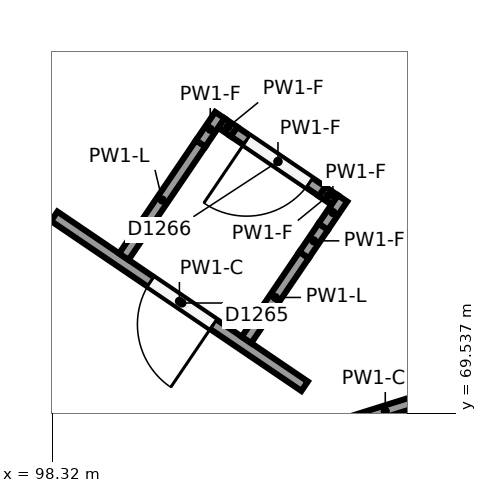
"""IFC4 building model, lengths in metres.
Left out: names, types, materials, properties, quantities, classifications, styles, units other than length and angle.
Written with IfcOpenShell. Run it as: python <this file> out.ifc"""

import sys

from ifc_helpers import new_model, si_unit, direction, frame, frame_2d, origin, origin_2d, place, context, subcontext, project, spatial, rectangle, circle, extrude, element, fill, save


model = new_model("IFC4")
c1 = context("Model", 3, precision=1e-05, world=origin(), true_north=direction((0.0, 1.0)))
c2 = subcontext(c1, "Body", "Model", "MODEL_VIEW")
j1 = project(units=[si_unit("LENGTHUNIT", "METRE"), si_unit("PLANEANGLEUNIT", "RADIAN")], contexts=[c1])
p1 = place(None, origin())
s1 = spatial("IfcSite", under=j1, at=p1, CompositionType="ELEMENT")
p2 = place(p1, origin())
s2 = spatial("IfcBuilding", under=s1, at=p2, CompositionType="ELEMENT")
p3 = place(p2, frame((0.0, 0.0, 12.0)))
s3 = spatial("IfcBuildingStorey", under=s2, at=p3, CompositionType="ELEMENT", Elevation=12.0)
p4 = place(p3, frame((101.14, 69.294, 0.0), z_axis=(0.0, 0.0, 1.0), x_axis=(1.0, 0.0, 0.0)))
e1 = element("IfcColumn", 1, at=p4, inside=s3, PredefinedType="COLUMN", context=c2, shape_type="SweptSolid", body=[
    extrude(circle(Radius=0.4, at=origin_2d()), origin(), (0.0, 0.0, 1.0), 6.0),
])
p5 = place(p3, frame((102.051, 69.36, 0.0), z_axis=(0.0, 0.0, 1.0), x_axis=(0.954243765566, 0.299029824395, 0.0)))
e2 = element("IfcWall", 2, at=p5, inside=s3, PredefinedType="PARTITIONING", context=c2, shape_type="SweptSolid", body=[
    extrude(rectangle(XDim=1.363, YDim=0.15, at=frame_2d((0.681, 0.0))), origin(), (0.0, 0.0, 1.0), 5.55),
])
p6 = place(p3, frame((101.639, 69.893, 0.0), z_axis=(0.0, 0.0, 1.0), x_axis=(-0.82747475675, 0.561502918017, 0.0)))
e3 = element("IfcWall", 3, at=p6, inside=s3, PredefinedType="PARTITIONING", context=c2, shape_type="SweptSolid", body=[
    extrude(rectangle(XDim=3.981, YDim=0.15, at=frame_2d((1.99, 0.0))), origin(), (0.0, 0.0, 1.0), 5.55),
])
p7 = place(p6, frame((1.45, 0.0, 0.0)))
e4 = element("IfcOpeningElement", 4, at=p7, cuts=e3, PredefinedType="OPENING", context=c2, shape_type="SweptSolid", body=[
    extrude(rectangle(XDim=1.0, YDim=2.1, at=frame_2d((0.5, 1.05))), frame((0.0, 0.085, 0.0), z_axis=(0.0, -1.0, 0.0), x_axis=(1.0, 0.0, 0.0)), (0.0, 0.0, 1.0), 0.17),
])
p8 = place(p3, frame((100.875, 70.502, 0.0), z_axis=(0.0, 0.0, 1.0), x_axis=(0.561567757892, 0.827430754382, 0.0)))
e5 = element("IfcWall", 5, at=p8, inside=s3, PredefinedType="PARTITIONING", context=c2, shape_type="SweptSolid", body=[
    extrude(rectangle(XDim=1.35, YDim=0.15, at=frame_2d((0.675, 0.0))), origin(), (0.0, 0.0, 1.0), 5.6),
])
p9 = place(p3, frame((101.633, 71.619, 0.0), z_axis=(0.0, 0.0, 1.0), x_axis=(0.561315731762, 0.827601745574, 0.0)))
e6 = element("IfcWall", 6, at=p9, inside=s3, PredefinedType="PARTITIONING", context=c2, shape_type="SweptSolid", body=[
    extrude(rectangle(XDim=0.45, YDim=0.15, at=frame_2d((0.225, 0.0))), origin(), (0.0, 0.0, 1.0), 4.3),
])
p10 = place(p3, frame((101.885, 71.992, 0.0), z_axis=(0.0, 0.0, 1.0), x_axis=(0.561567757892, 0.827430754382, 0.0)))
e7 = element("IfcWall", 7, at=p10, inside=s3, PredefinedType="PARTITIONING", context=c2, shape_type="SweptSolid", body=[
    extrude(rectangle(XDim=0.45, YDim=0.15, at=frame_2d((0.225, 0.0))), origin(), (0.0, 0.0, 1.0), 4.3),
])
p11 = place(p3, frame((99.261, 71.597, 0.0), z_axis=(0.0, 0.0, 1.0), x_axis=(0.561504735028, 0.82747352377, 0.0)))
e8 = element("IfcWall", 8, at=p11, inside=s3, PredefinedType="PARTITIONING", context=c2, shape_type="SweptSolid", body=[
    extrude(rectangle(XDim=1.8, YDim=0.15, at=frame_2d((0.9, 0.0))), origin(), (0.0, 0.0, 1.0), 5.6),
])
p12 = place(p3, frame((100.272, 73.086, 0.0), z_axis=(0.0, 0.0, 1.0), x_axis=(0.561315731762, 0.827601745574, 0.0)))
e9 = element("IfcWall", 9, at=p12, inside=s3, PredefinedType="PARTITIONING", context=c2, shape_type="SweptSolid", body=[
    extrude(rectangle(XDim=0.45, YDim=0.15, at=frame_2d((0.225, 0.0))), origin(), (0.0, 0.0, 1.0), 4.3),
])
p13 = place(p3, frame((102.034, 72.344, 0.0), z_axis=(0.0, 0.0, 1.0), x_axis=(-0.827516278761, 0.561441723053, 0.0)))
e10 = element("IfcWall", 10, at=p13, inside=s3, PredefinedType="PARTITIONING", context=c2, shape_type="SweptSolid", body=[
    extrude(rectangle(XDim=0.2, YDim=0.15, at=frame_2d((0.1, 0.0))), origin(), (0.0, 0.0, 1.0), 4.3),
])
p14 = place(p3, frame((101.868, 72.456, 0.0), z_axis=(0.0, 0.0, 1.0), x_axis=(-0.827461305414, 0.56152274045, 0.0)))
e11 = element("IfcWall", 11, at=p14, inside=s3, PredefinedType="PARTITIONING", context=c2, shape_type="SweptSolid", body=[
    extrude(rectangle(XDim=1.4, YDim=0.15, at=frame_2d((0.7, 0.0))), origin(), (0.0, 0.0, 1.0), 4.3),
])
p15 = place(p14, frame((0.2, 0.0, 0.0)))
e12 = element("IfcOpeningElement", 12, at=p15, cuts=e11, PredefinedType="OPENING", context=c2, shape_type="SweptSolid", body=[
    extrude(rectangle(XDim=1.0, YDim=2.1, at=frame_2d((0.5, 1.05))), frame((0.0, 0.085, 0.0), z_axis=(0.0, -1.0, 0.0), x_axis=(1.0, 0.0, 0.0)), (0.0, 0.0, 1.0), 0.17),
])
p16 = place(p3, frame((100.71, 73.242, 0.0), z_axis=(0.0, 0.0, 1.0), x_axis=(-0.827516278761, 0.561441723053, 0.0)))
e13 = element("IfcWall", 13, at=p16, inside=s3, PredefinedType="PARTITIONING", context=c2, shape_type="SweptSolid", body=[
    extrude(rectangle(XDim=0.2, YDim=0.15, at=frame_2d((0.1, 0.0))), origin(), (0.0, 0.0, 1.0), 4.3),
])
p17 = place(p7, origin())
e14 = element("IfcDoor", 14, at=p17, inside=s3, OperationType="SINGLE_SWING_LEFT", PredefinedType="DOOR", context=c2, shape_type="SweptSolid", body=[
    extrude(rectangle(XDim=1.0, YDim=2.1, at=frame_2d((0.5, 1.05))), frame((0.0, 0.025, 0.0), z_axis=(0.0, -1.0, 0.0), x_axis=(1.0, 0.0, 0.0)), (0.0, 0.0, 1.0), 0.05),
])
fill(e4, e14)
p18 = place(p15, origin())
e15 = element("IfcDoor", 15, at=p18, inside=s3, OperationType="SINGLE_SWING_RIGHT", PredefinedType="DOOR", context=c2, shape_type="SweptSolid", body=[
    extrude(rectangle(XDim=1.0, YDim=2.1, at=frame_2d((0.5, 1.05))), frame((0.0, 0.025, 0.0), z_axis=(0.0, -1.0, 0.0), x_axis=(1.0, 0.0, 0.0)), (0.0, 0.0, 1.0), 0.05),
])
fill(e12, e15)
save(model, sys.argv[1])
